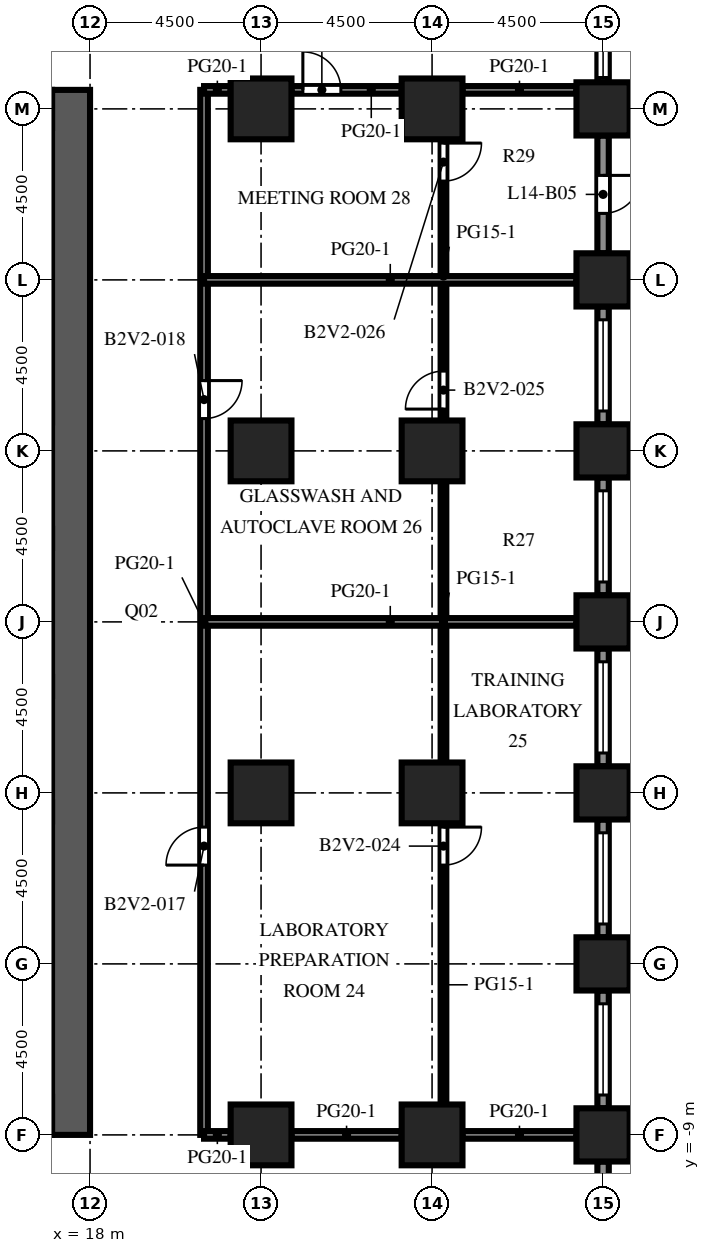
"""IFC4 building model, lengths in metres.
Left out: names, types, materials, properties, quantities, classifications, styles, units other than length and angle.
Written with IfcOpenShell. Run it as: python <this file> out.ifc"""

import sys

from ifc_helpers import new_model, si_unit, direction, frame, frame_2d, origin, origin_2d, place, context, subcontext, project, spatial, rectangle, extrude, element, fill, save


model = new_model("IFC4")
c1 = context("Model", 3, precision=1e-05, world=origin(), true_north=direction((0.0, 1.0)))
c2 = subcontext(c1, "Body", "Model", "MODEL_VIEW")
j1 = project(units=[si_unit("LENGTHUNIT", "METRE"), si_unit("PLANEANGLEUNIT", "RADIAN")], contexts=[c1])
p1 = place(None, origin())
s1 = spatial("IfcSite", under=j1, at=p1, CompositionType="ELEMENT")
p2 = place(p1, origin())
s2 = spatial("IfcBuilding", under=s1, at=p2, CompositionType="ELEMENT")
p3 = place(p2, frame((0.0, 0.0, 62.4)))
s3 = spatial("IfcBuildingStorey", under=s2, at=p3, CompositionType="ELEMENT", Elevation=62.4)
for number, where, z_axis, x_axis in (
    (1, (31.5, -9.0, 0.0), (0.0, 0.0, 1.0), (1.0, 0.0, 0.0)),
    (2, (31.5, -4.5, 0.0), (0.0, 0.0, 1.0), (1.0, 0.0, 0.0)),
    (3, (31.5, 0.0, 0.0), (0.0, 0.0, 1.0), (1.0, 0.0, 0.0)),
    (4, (31.5, 4.5, 0.0), (0.0, 0.0, 1.0), (1.0, 0.0, 0.0)),
    (5, (31.5, 9.0, 0.0), (0.0, 0.0, 1.0), (1.0, 0.0, 0.0)),
    (6, (31.5, 13.5, 0.0), (0.0, 0.0, 1.0), (1.0, 0.0, 0.0)),
    (7, (31.5, 18.0, 0.0), (0.0, 0.0, 1.0), (1.0, 0.0, 0.0)),
):
    element("IfcColumn", number, at=place(p3, frame(where, z_axis=z_axis, x_axis=x_axis)), inside=s3, PredefinedType="COLUMN", context=c2, shape_type="SweptSolid", body=[
        extrude(rectangle(XDim=1.4, YDim=1.4, at=origin_2d()), origin(), (0.0, 0.0, 1.0), 4.1),
    ])
for number, where, z_axis, x_axis in (
    (8, (22.5, -9.0, 0.0), (0.0, 0.0, 1.0), (1.0, 0.0, 0.0)),
    (9, (22.5, 0.0, 0.0), (0.0, 0.0, 1.0), (1.0, 0.0, 0.0)),
    (10, (22.5, 9.0, 0.0), (0.0, 0.0, 1.0), (1.0, 0.0, 0.0)),
    (11, (22.5, 18.0, 0.0), (0.0, 0.0, 1.0), (1.0, 0.0, 0.0)),
    (12, (27.0, -9.0, 0.0), (0.0, 0.0, 1.0), (1.0, 0.0, 0.0)),
    (13, (27.0, 0.0, 0.0), (0.0, 0.0, 1.0), (1.0, 0.0, 0.0)),
    (14, (27.0, 9.0, 0.0), (0.0, 0.0, 1.0), (1.0, 0.0, 0.0)),
    (15, (27.0, 18.0, 0.0), (0.0, 0.0, 1.0), (1.0, 0.0, 0.0)),
):
    element("IfcColumn", number, at=place(p3, frame(where, z_axis=z_axis, x_axis=x_axis)), inside=s3, PredefinedType="COLUMN", context=c2, shape_type="SweptSolid", body=[
        extrude(rectangle(XDim=1.6, YDim=1.6, at=origin_2d()), origin(), (0.0, 0.0, 1.0), 4.1),
    ])
p4 = place(p3, frame((17.5, -9.0, 0.0), z_axis=(0.0, 0.0, 1.0), x_axis=(0.0, 1.0, 0.0)))
e16 = element("IfcWall", 16, at=p4, inside=s3, PredefinedType="SHEAR", context=c2, shape_type="SweptSolid", body=[
    extrude(rectangle(XDim=27.5, YDim=1.0, at=frame_2d((13.75, 0.0))), origin(), (0.0, 0.0, 1.0), 4.1),
])
p5 = place(p4, frame((12.55, 0.0, 0.0)))
e17 = element("IfcOpeningElement", 17, at=p5, cuts=e16, PredefinedType="OPENING", context=c2, shape_type="SweptSolid", body=[
    extrude(rectangle(XDim=2.4, YDim=2.4, at=frame_2d((1.2, 1.2))), frame((0.0, 0.51, 0.0), z_axis=(0.0, -1.0, 0.0), x_axis=(1.0, 0.0, 0.0)), (0.0, 0.0, 1.0), 1.02),
])
p6 = place(p4, frame((6.825, 0.0, 0.0)))
e18 = element("IfcOpeningElement", 18, at=p6, cuts=e16, PredefinedType="OPENING", context=c2, shape_type="SweptSolid", body=[
    extrude(rectangle(XDim=1.2, YDim=2.1, at=frame_2d((0.6, 1.05))), frame((0.0, 0.51, 0.0), z_axis=(0.0, -1.0, 0.0), x_axis=(1.0, 0.0, 0.0)), (0.0, 0.0, 1.0), 1.02),
])
p7 = place(p4, frame((19.475, 0.0, 0.0)))
e19 = element("IfcOpeningElement", 19, at=p7, cuts=e16, PredefinedType="OPENING", context=c2, shape_type="SweptSolid", body=[
    extrude(rectangle(XDim=1.2, YDim=2.1, at=frame_2d((0.6, 1.05))), frame((0.0, 0.51, 0.0), z_axis=(0.0, -1.0, 0.0), x_axis=(1.0, 0.0, 0.0)), (0.0, 0.0, 1.0), 1.02),
])
p8 = place(p3, frame((31.5, -9.7, 0.0), z_axis=(0.0, 0.0, 1.0), x_axis=(0.0, -1.0, 0.0)))
e20 = element("IfcWall", 20, at=p8, inside=s3, PredefinedType="SOLIDWALL", context=c2, shape_type="SweptSolid", body=[
    extrude(rectangle(XDim=3.1, YDim=0.3, at=frame_2d((1.55, 0.0))), origin(), (0.0, 0.0, 1.0), 2.75),
])
p9 = place(p8, frame((0.475, 0.0, 0.8)))
e21 = element("IfcOpeningElement", 21, at=p9, cuts=e20, PredefinedType="OPENING", context=c2, shape_type="SweptSolid", body=[
    extrude(rectangle(XDim=1.2, YDim=1.7, at=frame_2d((0.6, 0.85))), frame((0.0, 0.16, 0.0), z_axis=(0.0, -1.0, 0.0), x_axis=(1.0, 0.0, 0.0)), (0.0, 0.0, 1.0), 0.32),
])
p10 = place(p3, frame((31.5, -5.2, 0.0), z_axis=(0.0, 0.0, 1.0), x_axis=(0.0, -1.0, 0.0)))
e22 = element("IfcWall", 22, at=p10, inside=s3, PredefinedType="SOLIDWALL", context=c2, shape_type="SweptSolid", body=[
    extrude(rectangle(XDim=3.1, YDim=0.3, at=frame_2d((1.55, 0.0))), origin(), (0.0, 0.0, 1.0), 2.75),
])
p11 = place(p10, frame((0.35, 0.0, 0.8)))
e23 = element("IfcOpeningElement", 23, at=p11, cuts=e22, PredefinedType="OPENING", context=c2, shape_type="SweptSolid", body=[
    extrude(rectangle(XDim=2.4, YDim=1.7, at=frame_2d((1.2, 0.85))), frame((0.0, 0.16, 0.0), z_axis=(0.0, -1.0, 0.0), x_axis=(1.0, 0.0, 0.0)), (0.0, 0.0, 1.0), 0.32),
])
p12 = place(p3, frame((31.5, -0.7, 0.0), z_axis=(0.0, 0.0, 1.0), x_axis=(0.0, -1.0, 0.0)))
e24 = element("IfcWall", 24, at=p12, inside=s3, PredefinedType="SOLIDWALL", context=c2, shape_type="SweptSolid", body=[
    extrude(rectangle(XDim=3.1, YDim=0.3, at=frame_2d((1.55, 0.0))), origin(), (0.0, 0.0, 1.0), 2.75),
])
p13 = place(p12, frame((0.35, 0.0, 0.8)))
e25 = element("IfcOpeningElement", 25, at=p13, cuts=e24, PredefinedType="OPENING", context=c2, shape_type="SweptSolid", body=[
    extrude(rectangle(XDim=2.4, YDim=1.7, at=frame_2d((1.2, 0.85))), frame((0.0, 0.16, 0.0), z_axis=(0.0, -1.0, 0.0), x_axis=(1.0, 0.0, 0.0)), (0.0, 0.0, 1.0), 0.32),
])
p14 = place(p3, frame((31.5, 3.8, 0.0), z_axis=(0.0, 0.0, 1.0), x_axis=(0.0, -1.0, 0.0)))
e26 = element("IfcWall", 26, at=p14, inside=s3, PredefinedType="SOLIDWALL", context=c2, shape_type="SweptSolid", body=[
    extrude(rectangle(XDim=3.1, YDim=0.3, at=frame_2d((1.55, 0.0))), origin(), (0.0, 0.0, 1.0), 2.75),
])
p15 = place(p14, frame((0.35, 0.0, 0.8)))
e27 = element("IfcOpeningElement", 27, at=p15, cuts=e26, PredefinedType="OPENING", context=c2, shape_type="SweptSolid", body=[
    extrude(rectangle(XDim=2.4, YDim=1.7, at=frame_2d((1.2, 0.85))), frame((0.0, 0.16, 0.0), z_axis=(0.0, -1.0, 0.0), x_axis=(1.0, 0.0, 0.0)), (0.0, 0.0, 1.0), 0.32),
])
p16 = place(p3, frame((31.5, 8.3, 0.0), z_axis=(0.0, 0.0, 1.0), x_axis=(0.0, -1.0, 0.0)))
e28 = element("IfcWall", 28, at=p16, inside=s3, PredefinedType="SOLIDWALL", context=c2, shape_type="SweptSolid", body=[
    extrude(rectangle(XDim=3.1, YDim=0.3, at=frame_2d((1.55, 0.0))), origin(), (0.0, 0.0, 1.0), 2.75),
])
p17 = place(p16, frame((0.35, 0.0, 0.8)))
e29 = element("IfcOpeningElement", 29, at=p17, cuts=e28, PredefinedType="OPENING", context=c2, shape_type="SweptSolid", body=[
    extrude(rectangle(XDim=2.4, YDim=1.7, at=frame_2d((1.2, 0.85))), frame((0.0, 0.16, 0.0), z_axis=(0.0, -1.0, 0.0), x_axis=(1.0, 0.0, 0.0)), (0.0, 0.0, 1.0), 0.32),
])
p18 = place(p3, frame((31.5, 12.8, 0.0), z_axis=(0.0, 0.0, 1.0), x_axis=(0.0, -1.0, 0.0)))
e30 = element("IfcWall", 30, at=p18, inside=s3, PredefinedType="SOLIDWALL", context=c2, shape_type="SweptSolid", body=[
    extrude(rectangle(XDim=3.1, YDim=0.3, at=frame_2d((1.55, 0.0))), origin(), (0.0, 0.0, 1.0), 2.75),
])
p19 = place(p18, frame((0.35, 0.0, 0.8)))
e31 = element("IfcOpeningElement", 31, at=p19, cuts=e30, PredefinedType="OPENING", context=c2, shape_type="SweptSolid", body=[
    extrude(rectangle(XDim=2.4, YDim=1.7, at=frame_2d((1.2, 0.85))), frame((0.0, 0.16, 0.0), z_axis=(0.0, -1.0, 0.0), x_axis=(1.0, 0.0, 0.0)), (0.0, 0.0, 1.0), 0.32),
])
p20 = place(p3, frame((31.5, 17.3, 0.0), z_axis=(0.0, 0.0, 1.0), x_axis=(0.0, -1.0, 0.0)))
e32 = element("IfcWall", 32, at=p20, inside=s3, PredefinedType="SOLIDWALL", context=c2, shape_type="SweptSolid", body=[
    extrude(rectangle(XDim=3.1, YDim=0.3, at=frame_2d((1.55, 0.0))), origin(), (0.0, 0.0, 1.0), 2.75),
])
p21 = place(p20, frame((1.05, 0.0, 0.0)))
e33 = element("IfcOpeningElement", 33, at=p21, cuts=e32, PredefinedType="OPENING", context=c2, shape_type="SweptSolid", body=[
    extrude(rectangle(XDim=1.0, YDim=2.2, at=frame_2d((0.5, 1.1))), frame((0.0, 0.16, 0.0), z_axis=(0.0, -1.0, 0.0), x_axis=(1.0, 0.0, 0.0)), (0.0, 0.0, 1.0), 0.32),
])
p22 = place(p3, frame((31.5, 21.8, 0.0), z_axis=(0.0, 0.0, 1.0), x_axis=(0.0, -1.0, 0.0)))
e34 = element("IfcWall", 34, at=p22, inside=s3, PredefinedType="SOLIDWALL", context=c2, shape_type="SweptSolid", body=[
    extrude(rectangle(XDim=3.1, YDim=0.3, at=frame_2d((1.55, 0.0))), origin(), (0.0, 0.0, 1.0), 2.75),
])
p23 = place(p22, frame((0.575, 0.0, 0.8)))
e35 = element("IfcOpeningElement", 35, at=p23, cuts=e34, PredefinedType="OPENING", context=c2, shape_type="SweptSolid", body=[
    extrude(rectangle(XDim=2.4, YDim=1.7, at=frame_2d((1.2, 0.85))), frame((0.0, 0.16, 0.0), z_axis=(0.0, -1.0, 0.0), x_axis=(1.0, 0.0, 0.0)), (0.0, 0.0, 1.0), 0.32),
])
p24 = place(p3, frame((21.0, 18.5, 0.0), z_axis=(0.0, 0.0, 1.0), x_axis=(0.0, -1.0, 0.0)))
e36 = element("IfcWall", 36, at=p24, inside=s3, PredefinedType="PARTITIONING", context=c2, shape_type="SweptSolid", body=[
    extrude(rectangle(XDim=27.5, YDim=0.2, at=frame_2d((13.75, 0.0))), origin(), (0.0, 0.0, 1.0), 3.65),
])
p25 = place(p24, frame((19.4, 0.0, 0.0)))
e37 = element("IfcOpeningElement", 37, at=p25, cuts=e36, PredefinedType="OPENING", context=c2, shape_type="SweptSolid", body=[
    extrude(rectangle(XDim=1.0, YDim=2.1, at=frame_2d((0.5, 1.05))), frame((0.0, 0.11, 0.0), z_axis=(0.0, -1.0, 0.0), x_axis=(1.0, 0.0, 0.0)), (0.0, 0.0, 1.0), 0.22),
])
p26 = place(p24, frame((7.65, 0.0, 0.0)))
e38 = element("IfcOpeningElement", 38, at=p26, cuts=e36, PredefinedType="OPENING", context=c2, shape_type="SweptSolid", body=[
    extrude(rectangle(XDim=1.0, YDim=2.1, at=frame_2d((0.5, 1.05))), frame((0.0, 0.11, 0.0), z_axis=(0.0, -1.0, 0.0), x_axis=(1.0, 0.0, 0.0)), (0.0, 0.0, 1.0), 0.22),
])
p27 = place(p3, frame((27.3, -0.8, 0.0), z_axis=(0.0, 0.0, 1.0), x_axis=(0.0, -1.0, 0.0)))
e39 = element("IfcWall", 39, at=p27, inside=s3, PredefinedType="PARTITIONING", context=c2, shape_type="SweptSolid", body=[
    extrude(rectangle(XDim=7.4, YDim=0.15, at=frame_2d((3.7, 0.0))), origin(), (0.0, 0.0, 1.0), 3.65),
])
p28 = place(p27, frame((0.1, 0.0, 0.0)))
e40 = element("IfcOpeningElement", 40, at=p28, cuts=e39, PredefinedType="OPENING", context=c2, shape_type="SweptSolid", body=[
    extrude(rectangle(XDim=1.0, YDim=2.1, at=frame_2d((0.5, 1.05))), frame((0.0, 0.085, 0.0), z_axis=(0.0, -1.0, 0.0), x_axis=(1.0, 0.0, 0.0)), (0.0, 0.0, 1.0), 0.17),
])
p29 = place(p3, frame((27.3, 0.8, 0.0), z_axis=(0.0, 0.0, 1.0), x_axis=(0.0, 1.0, 0.0)))
e41 = element("IfcWall", 41, at=p29, inside=s3, PredefinedType="PARTITIONING", context=c2, shape_type="SweptSolid", body=[
    extrude(rectangle(XDim=7.4, YDim=0.15, at=frame_2d((3.7, 0.0))), origin(), (0.0, 0.0, 1.0), 3.65),
])
p30 = place(p3, frame((27.3, 17.2, 0.0), z_axis=(0.0, 0.0, 1.0), x_axis=(0.0, -1.0, 0.0)))
e42 = element("IfcWall", 42, at=p30, inside=s3, PredefinedType="PARTITIONING", context=c2, shape_type="SweptSolid", body=[
    extrude(rectangle(XDim=7.4, YDim=0.15, at=frame_2d((3.7, 0.0))), origin(), (0.0, 0.0, 1.0), 3.65),
])
p31 = place(p30, frame((6.1, 0.0, 0.0)))
e43 = element("IfcOpeningElement", 43, at=p31, cuts=e42, PredefinedType="OPENING", context=c2, shape_type="SweptSolid", body=[
    extrude(rectangle(XDim=1.0, YDim=2.1, at=frame_2d((0.5, 1.05))), frame((0.0, 0.085, 0.0), z_axis=(0.0, -1.0, 0.0), x_axis=(1.0, 0.0, 0.0)), (0.0, 0.0, 1.0), 0.17),
])
p32 = place(p30, frame((0.1, 0.0, 0.0)))
e44 = element("IfcOpeningElement", 44, at=p32, cuts=e42, PredefinedType="OPENING", context=c2, shape_type="SweptSolid", body=[
    extrude(rectangle(XDim=1.0, YDim=2.1, at=frame_2d((0.5, 1.05))), frame((0.0, 0.085, 0.0), z_axis=(0.0, -1.0, 0.0), x_axis=(1.0, 0.0, 0.0)), (0.0, 0.0, 1.0), 0.17),
])
p33 = place(p3, frame((21.0, -9.0, 0.0), z_axis=(0.0, 0.0, 1.0), x_axis=(1.0, 0.0, 0.0)))
e45 = element("IfcWall", 45, at=p33, inside=s3, PredefinedType="PARTITIONING", context=c2, shape_type="SweptSolid", body=[
    extrude(rectangle(XDim=0.7, YDim=0.2, at=frame_2d((0.35, 0.0))), origin(), (0.0, 0.0, 1.0), 3.65),
])
p34 = place(p3, frame((23.3, -9.0, 0.0), z_axis=(0.0, 0.0, 1.0), x_axis=(1.0, 0.0, 0.0)))
e46 = element("IfcWall", 46, at=p34, inside=s3, PredefinedType="PARTITIONING", context=c2, shape_type="SweptSolid", body=[
    extrude(rectangle(XDim=2.9, YDim=0.2, at=frame_2d((1.45, 0.0))), origin(), (0.0, 0.0, 1.0), 3.65),
])
p35 = place(p3, frame((27.8, -9.0, 0.0), z_axis=(0.0, 0.0, 1.0), x_axis=(1.0, 0.0, 0.0)))
e47 = element("IfcWall", 47, at=p35, inside=s3, PredefinedType="PARTITIONING", context=c2, shape_type="SweptSolid", body=[
    extrude(rectangle(XDim=3.0, YDim=0.2, at=frame_2d((1.5, 0.0))), origin(), (0.0, 0.0, 1.0), 3.65),
])
for number, where, z_axis, x_axis in (
    (48, (21.0, 4.5, 0.0), (0.0, 0.0, 1.0), (1.0, 0.0, 0.0)),
    (49, (21.0, 13.5, 0.0), (0.0, 0.0, 1.0), (1.0, 0.0, 0.0)),
):
    element("IfcWall", number, at=place(p3, frame(where, z_axis=z_axis, x_axis=x_axis)), inside=s3, PredefinedType="PARTITIONING", context=c2, shape_type="SweptSolid", body=[
        extrude(rectangle(XDim=9.8, YDim=0.2, at=frame_2d((4.9, 0.0))), origin(), (0.0, 0.0, 1.0), 3.65),
    ])
p36 = place(p3, frame((21.0, 18.5, 0.0), z_axis=(0.0, 0.0, 1.0), x_axis=(1.0, 0.0, 0.0)))
e50 = element("IfcWall", 50, at=p36, inside=s3, PredefinedType="PARTITIONING", context=c2, shape_type="SweptSolid", body=[
    extrude(rectangle(XDim=0.7, YDim=0.2, at=frame_2d((0.35, 0.0))), origin(), (0.0, 0.0, 1.0), 3.65),
])
p37 = place(p3, frame((26.2, 18.5, 0.0), z_axis=(0.0, 0.0, 1.0), x_axis=(-1.0, 0.0, 0.0)))
e51 = element("IfcWall", 51, at=p37, inside=s3, PredefinedType="PARTITIONING", context=c2, shape_type="SweptSolid", body=[
    extrude(rectangle(XDim=2.9, YDim=0.2, at=frame_2d((1.45, 0.0))), origin(), (0.0, 0.0, 1.0), 3.65),
])
p38 = place(p37, frame((1.6, 0.0, 0.0)))
e52 = element("IfcOpeningElement", 52, at=p38, cuts=e51, PredefinedType="OPENING", context=c2, shape_type="SweptSolid", body=[
    extrude(rectangle(XDim=1.0, YDim=2.1, at=frame_2d((0.5, 1.05))), frame((0.0, 0.11, 0.0), z_axis=(0.0, -1.0, 0.0), x_axis=(1.0, 0.0, 0.0)), (0.0, 0.0, 1.0), 0.22),
])
p39 = place(p3, frame((27.8, 18.5, 0.0), z_axis=(0.0, 0.0, 1.0), x_axis=(1.0, 0.0, 0.0)))
e53 = element("IfcWall", 53, at=p39, inside=s3, PredefinedType="PARTITIONING", context=c2, shape_type="SweptSolid", body=[
    extrude(rectangle(XDim=3.0, YDim=0.2, at=frame_2d((1.5, 0.0))), origin(), (0.0, 0.0, 1.0), 3.65),
])
p40 = place(p11, origin())
e54 = element("IfcWindow", 54, at=p40, inside=s3, PartitioningType="SINGLE_PANEL", PredefinedType="WINDOW", context=c2, shape_type="SweptSolid", body=[
    extrude(rectangle(XDim=2.4, YDim=1.7, at=frame_2d((1.2, 0.85))), frame((0.0, 0.03, 0.0), z_axis=(0.0, -1.0, 0.0), x_axis=(1.0, 0.0, 0.0)), (0.0, 0.0, 1.0), 0.06),
])
fill(e23, e54)
p41 = place(p13, origin())
e55 = element("IfcWindow", 55, at=p41, inside=s3, PartitioningType="SINGLE_PANEL", PredefinedType="WINDOW", context=c2, shape_type="SweptSolid", body=[
    extrude(rectangle(XDim=2.4, YDim=1.7, at=frame_2d((1.2, 0.85))), frame((0.0, 0.03, 0.0), z_axis=(0.0, -1.0, 0.0), x_axis=(1.0, 0.0, 0.0)), (0.0, 0.0, 1.0), 0.06),
])
fill(e25, e55)
p42 = place(p15, origin())
e56 = element("IfcWindow", 56, at=p42, inside=s3, PartitioningType="SINGLE_PANEL", PredefinedType="WINDOW", context=c2, shape_type="SweptSolid", body=[
    extrude(rectangle(XDim=2.4, YDim=1.7, at=frame_2d((1.2, 0.85))), frame((0.0, 0.03, 0.0), z_axis=(0.0, -1.0, 0.0), x_axis=(1.0, 0.0, 0.0)), (0.0, 0.0, 1.0), 0.06),
])
fill(e27, e56)
p43 = place(p17, origin())
e57 = element("IfcWindow", 57, at=p43, inside=s3, PartitioningType="SINGLE_PANEL", PredefinedType="WINDOW", context=c2, shape_type="SweptSolid", body=[
    extrude(rectangle(XDim=2.4, YDim=1.7, at=frame_2d((1.2, 0.85))), frame((0.0, 0.03, 0.0), z_axis=(0.0, -1.0, 0.0), x_axis=(1.0, 0.0, 0.0)), (0.0, 0.0, 1.0), 0.06),
])
fill(e29, e57)
p44 = place(p19, origin())
e58 = element("IfcWindow", 58, at=p44, inside=s3, PartitioningType="SINGLE_PANEL", PredefinedType="WINDOW", context=c2, shape_type="SweptSolid", body=[
    extrude(rectangle(XDim=2.4, YDim=1.7, at=frame_2d((1.2, 0.85))), frame((0.0, 0.03, 0.0), z_axis=(0.0, -1.0, 0.0), x_axis=(1.0, 0.0, 0.0)), (0.0, 0.0, 1.0), 0.06),
])
fill(e31, e58)
p45 = place(p21, origin())
e59 = element("IfcDoor", 59, at=p45, inside=s3, OperationType="SINGLE_SWING_LEFT", PredefinedType="DOOR", context=c2, shape_type="SweptSolid", body=[
    extrude(rectangle(XDim=1.0, YDim=2.2, at=frame_2d((0.5, 1.1))), frame((0.0, 0.025, 0.0), z_axis=(0.0, -1.0, 0.0), x_axis=(1.0, 0.0, 0.0)), (0.0, 0.0, 1.0), 0.05),
])
fill(e33, e59)
p46 = place(p23, origin())
e60 = element("IfcWindow", 60, at=p46, inside=s3, PartitioningType="SINGLE_PANEL", PredefinedType="WINDOW", context=c2, shape_type="SweptSolid", body=[
    extrude(rectangle(XDim=2.4, YDim=1.7, at=frame_2d((1.2, 0.85))), frame((0.0, 0.03, 0.0), z_axis=(0.0, -1.0, 0.0), x_axis=(1.0, 0.0, 0.0)), (0.0, 0.0, 1.0), 0.06),
])
fill(e35, e60)
p47 = place(p5, origin())
e61 = element("IfcDoor", 61, at=p47, inside=s3, OperationType="DOUBLE_DOOR_DOUBLE_SWING", PredefinedType="DOOR", context=c2, shape_type="SweptSolid", body=[
    extrude(rectangle(XDim=2.4, YDim=2.4, at=frame_2d((1.2, 1.2))), frame((0.0, 0.025, 0.0), z_axis=(0.0, -1.0, 0.0), x_axis=(1.0, 0.0, 0.0)), (0.0, 0.0, 1.0), 0.05),
])
fill(e17, e61)
p48 = place(p6, frame((1.2, 0.0, 0.0), z_axis=(0.0, 0.0, 1.0), x_axis=(-1.0, 0.0, 0.0)))
e62 = element("IfcDoor", 62, at=p48, inside=s3, OperationType="SINGLE_SWING_LEFT", PredefinedType="DOOR", context=c2, shape_type="SweptSolid", body=[
    extrude(rectangle(XDim=1.2, YDim=2.1, at=frame_2d((0.6, 1.05))), frame((0.0, 0.025, 0.0), z_axis=(0.0, -1.0, 0.0), x_axis=(1.0, 0.0, 0.0)), (0.0, 0.0, 1.0), 0.05),
])
fill(e18, e62)
p49 = place(p7, frame((1.2, 0.0, 0.0), z_axis=(0.0, 0.0, 1.0), x_axis=(-1.0, 0.0, 0.0)))
e63 = element("IfcDoor", 63, at=p49, inside=s3, OperationType="SINGLE_SWING_LEFT", PredefinedType="DOOR", context=c2, shape_type="SweptSolid", body=[
    extrude(rectangle(XDim=1.2, YDim=2.1, at=frame_2d((0.6, 1.05))), frame((0.0, 0.025, 0.0), z_axis=(0.0, -1.0, 0.0), x_axis=(1.0, 0.0, 0.0)), (0.0, 0.0, 1.0), 0.05),
])
fill(e19, e63)
p50 = place(p38, origin())
e64 = element("IfcDoor", 64, at=p50, inside=s3, OperationType="SINGLE_SWING_RIGHT", PredefinedType="DOOR", context=c2, shape_type="SweptSolid", body=[
    extrude(rectangle(XDim=1.0, YDim=2.1, at=frame_2d((0.5, 1.05))), frame((0.0, 0.025, 0.0), z_axis=(0.0, -1.0, 0.0), x_axis=(1.0, 0.0, 0.0)), (0.0, 0.0, 1.0), 0.05),
])
fill(e52, e64)
p51 = place(p25, origin())
e65 = element("IfcDoor", 65, at=p51, inside=s3, OperationType="SINGLE_SWING_RIGHT", PredefinedType="DOOR", context=c2, shape_type="SweptSolid", body=[
    extrude(rectangle(XDim=1.0, YDim=2.1, at=frame_2d((0.5, 1.05))), frame((0.0, 0.025, 0.0), z_axis=(0.0, -1.0, 0.0), x_axis=(1.0, 0.0, 0.0)), (0.0, 0.0, 1.0), 0.05),
])
fill(e37, e65)
p52 = place(p26, origin())
e66 = element("IfcDoor", 66, at=p52, inside=s3, OperationType="SINGLE_SWING_LEFT", PredefinedType="DOOR", context=c2, shape_type="SweptSolid", body=[
    extrude(rectangle(XDim=1.0, YDim=2.1, at=frame_2d((0.5, 1.05))), frame((0.0, 0.025, 0.0), z_axis=(0.0, -1.0, 0.0), x_axis=(1.0, 0.0, 0.0)), (0.0, 0.0, 1.0), 0.05),
])
fill(e38, e66)
p53 = place(p28, origin())
e67 = element("IfcDoor", 67, at=p53, inside=s3, OperationType="SINGLE_SWING_LEFT", PredefinedType="DOOR", context=c2, shape_type="SweptSolid", body=[
    extrude(rectangle(XDim=1.0, YDim=2.1, at=frame_2d((0.5, 1.05))), frame((0.0, 0.025, 0.0), z_axis=(0.0, -1.0, 0.0), x_axis=(1.0, 0.0, 0.0)), (0.0, 0.0, 1.0), 0.05),
])
fill(e40, e67)
p54 = place(p31, origin())
e68 = element("IfcDoor", 68, at=p54, inside=s3, OperationType="SINGLE_SWING_RIGHT", PredefinedType="DOOR", context=c2, shape_type="SweptSolid", body=[
    extrude(rectangle(XDim=1.0, YDim=2.1, at=frame_2d((0.5, 1.05))), frame((0.0, 0.025, 0.0), z_axis=(0.0, -1.0, 0.0), x_axis=(1.0, 0.0, 0.0)), (0.0, 0.0, 1.0), 0.05),
])
fill(e43, e68)
p55 = place(p32, origin())
e69 = element("IfcDoor", 69, at=p55, inside=s3, OperationType="SINGLE_SWING_LEFT", PredefinedType="DOOR", context=c2, shape_type="SweptSolid", body=[
    extrude(rectangle(XDim=1.0, YDim=2.1, at=frame_2d((0.5, 1.05))), frame((0.0, 0.025, 0.0), z_axis=(0.0, -1.0, 0.0), x_axis=(1.0, 0.0, 0.0)), (0.0, 0.0, 1.0), 0.05),
])
fill(e44, e69)
save(model, sys.argv[1])
